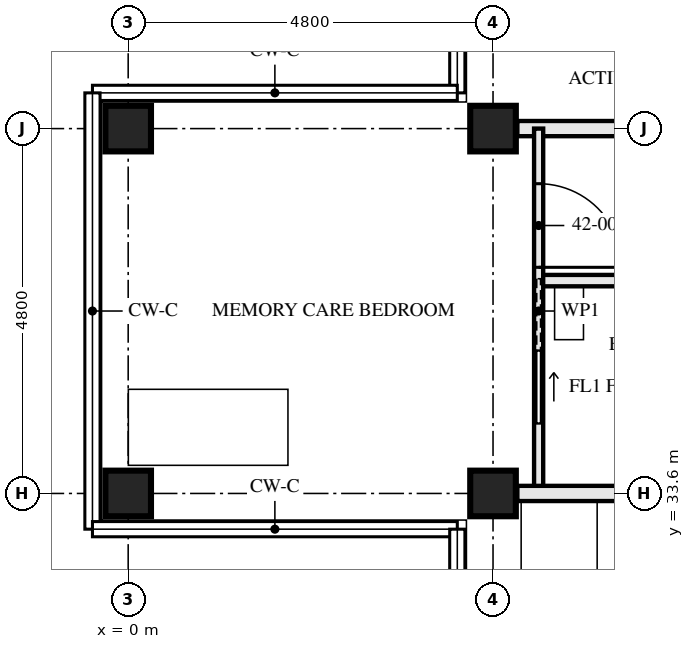
"""IFC4 building model, lengths in metres.
Left out: names, types, materials, properties, quantities, classifications, styles, units other than length and angle.
Written with IfcOpenShell. Run it as: python <this file> out.ifc"""

import sys

from ifc_helpers import new_model, si_unit, direction, frame, frame_2d, origin, origin_2d, place, context, subcontext, project, spatial, rectangle, hollow_rectangle, extrude, element, fill, save


model = new_model("IFC4")
c1 = context("Model", 3, precision=1e-05, world=origin(), true_north=direction((0.0, 1.0)))
c2 = subcontext(c1, "Body", "Model", "MODEL_VIEW")
j1 = project(units=[si_unit("LENGTHUNIT", "METRE"), si_unit("PLANEANGLEUNIT", "RADIAN")], contexts=[c1])
p1 = place(None, origin())
s1 = spatial("IfcSite", under=j1, at=p1, CompositionType="ELEMENT")
p2 = place(p1, origin())
s2 = spatial("IfcBuilding", under=s1, at=p2, CompositionType="ELEMENT")
p3 = place(p2, frame((0.0, 0.0, 155.0)))
s3 = spatial("IfcBuildingStorey", under=s2, at=p3, CompositionType="ELEMENT", Elevation=155.0)
for number, where, z_axis, x_axis in (
    (1, (0.0, 33.6, 0.0), (0.0, 0.0, 1.0), (0.0, 1.0, 0.0)),
    (2, (0.0, 38.4, 0.0), (0.0, 0.0, 1.0), (0.0, 1.0, 0.0)),
    (3, (4.8, 33.6, 0.0), (0.0, 0.0, 1.0), (0.0, 1.0, 0.0)),
    (4, (4.8, 38.4, 0.0), (0.0, 0.0, 1.0), (0.0, 1.0, 0.0)),
):
    element("IfcColumn", number, at=place(p3, frame(where, z_axis=z_axis, x_axis=x_axis)), inside=s3, PredefinedType="COLUMN", context=c2, shape_type="SweptSolid", body=[
        extrude(hollow_rectangle(XDim=0.6, YDim=0.6, WallThickness=0.06, at=origin_2d()), origin(), (0.0, 0.0, 1.0), 3.5),
    ])
p4 = place(p3, frame((5.12, 38.4, 0.0), z_axis=(0.0, 0.0, 1.0), x_axis=(1.0, 0.0, 0.0)))
e5 = element("IfcWall", 5, at=p4, inside=s3, PredefinedType="PARTITIONING", context=c2, shape_type="SweptSolid", body=[
    extrude(rectangle(XDim=7.28, YDim=0.2, at=frame_2d((3.64, 0.0))), origin(), (0.0, 0.0, 1.0), 2.55),
])
p5 = place(p3, frame((5.4, 36.4, 0.0), z_axis=(0.0, 0.0, 1.0), x_axis=(1.0, 0.0, 0.0)))
e6 = element("IfcWall", 6, at=p5, inside=s3, PredefinedType="PARTITIONING", context=c2, shape_type="SweptSolid", body=[
    extrude(rectangle(XDim=3.0, YDim=0.15, at=frame_2d((1.5, 0.0))), origin(), (0.0, 0.0, 1.0), 3.33),
])
p6 = place(p3, frame((5.4, 38.4, 0.0), z_axis=(0.0, 0.0, 1.0), x_axis=(0.0, -1.0, 0.0)))
e7 = element("IfcWall", 7, at=p6, inside=s3, PredefinedType="PARTITIONING", context=c2, shape_type="SweptSolid", body=[
    extrude(rectangle(XDim=4.8, YDim=0.12, at=frame_2d((2.4, 0.0))), origin(), (0.0, 0.0, 1.0), 3.33),
])
p7 = place(p6, frame((0.725, 0.0, 0.0)))
e8 = element("IfcOpeningElement", 8, at=p7, cuts=e7, PredefinedType="OPENING", context=c2, shape_type="SweptSolid", body=[
    extrude(rectangle(XDim=1.1, YDim=2.1, at=frame_2d((0.55, 1.05))), frame((0.0, 0.071, 0.0), z_axis=(0.0, -1.0, 0.0), x_axis=(1.0, 0.0, 0.0)), (0.0, 0.0, 1.0), 0.141),
])
p8 = place(p6, frame((2.925, 0.0, 0.0)))
e9 = element("IfcOpeningElement", 9, at=p8, cuts=e7, PredefinedType="OPENING", context=c2, shape_type="SweptSolid", body=[
    extrude(rectangle(XDim=0.95, YDim=2.1, at=frame_2d((0.475, 1.05))), frame((0.0, 0.071, 0.0), z_axis=(0.0, -1.0, 0.0), x_axis=(1.0, 0.0, 0.0)), (0.0, 0.0, 1.0), 0.141),
])
p9 = place(p3, frame((5.12, 33.6, 0.0), z_axis=(0.0, 0.0, 1.0), x_axis=(1.0, 0.0, 0.0)))
e10 = element("IfcWall", 10, at=p9, inside=s3, PredefinedType="PARTITIONING", context=c2, shape_type="SweptSolid", body=[
    extrude(rectangle(XDim=7.28, YDim=0.2, at=frame_2d((3.64, 0.0))), origin(), (0.0, 0.0, 1.0), 2.55),
])
p10 = place(p7, origin())
e11 = element("IfcDoor", 11, at=p10, inside=s3, OperationType="SINGLE_SWING_LEFT", PredefinedType="DOOR", context=c2, shape_type="SweptSolid", body=[
    extrude(rectangle(XDim=1.1, YDim=2.1, at=frame_2d((0.55, 1.05))), frame((0.0, 0.022, 0.0), z_axis=(0.0, -1.0, 0.0), x_axis=(1.0, 0.0, 0.0)), (0.0, 0.0, 1.0), 0.044),
])
fill(e8, e11)
p11 = place(p8, origin())
e12 = element("IfcDoor", 12, at=p11, inside=s3, OperationType="SLIDING_TO_RIGHT", PredefinedType="DOOR", context=c2, shape_type="SweptSolid", body=[
    extrude(rectangle(XDim=0.95, YDim=2.1, at=frame_2d((0.475, 1.05))), frame((0.0, 0.022, 0.0), z_axis=(0.0, -1.0, 0.0), x_axis=(1.0, 0.0, 0.0)), (0.0, 0.0, 1.0), 0.044),
])
fill(e9, e12)
save(model, sys.argv[1])
